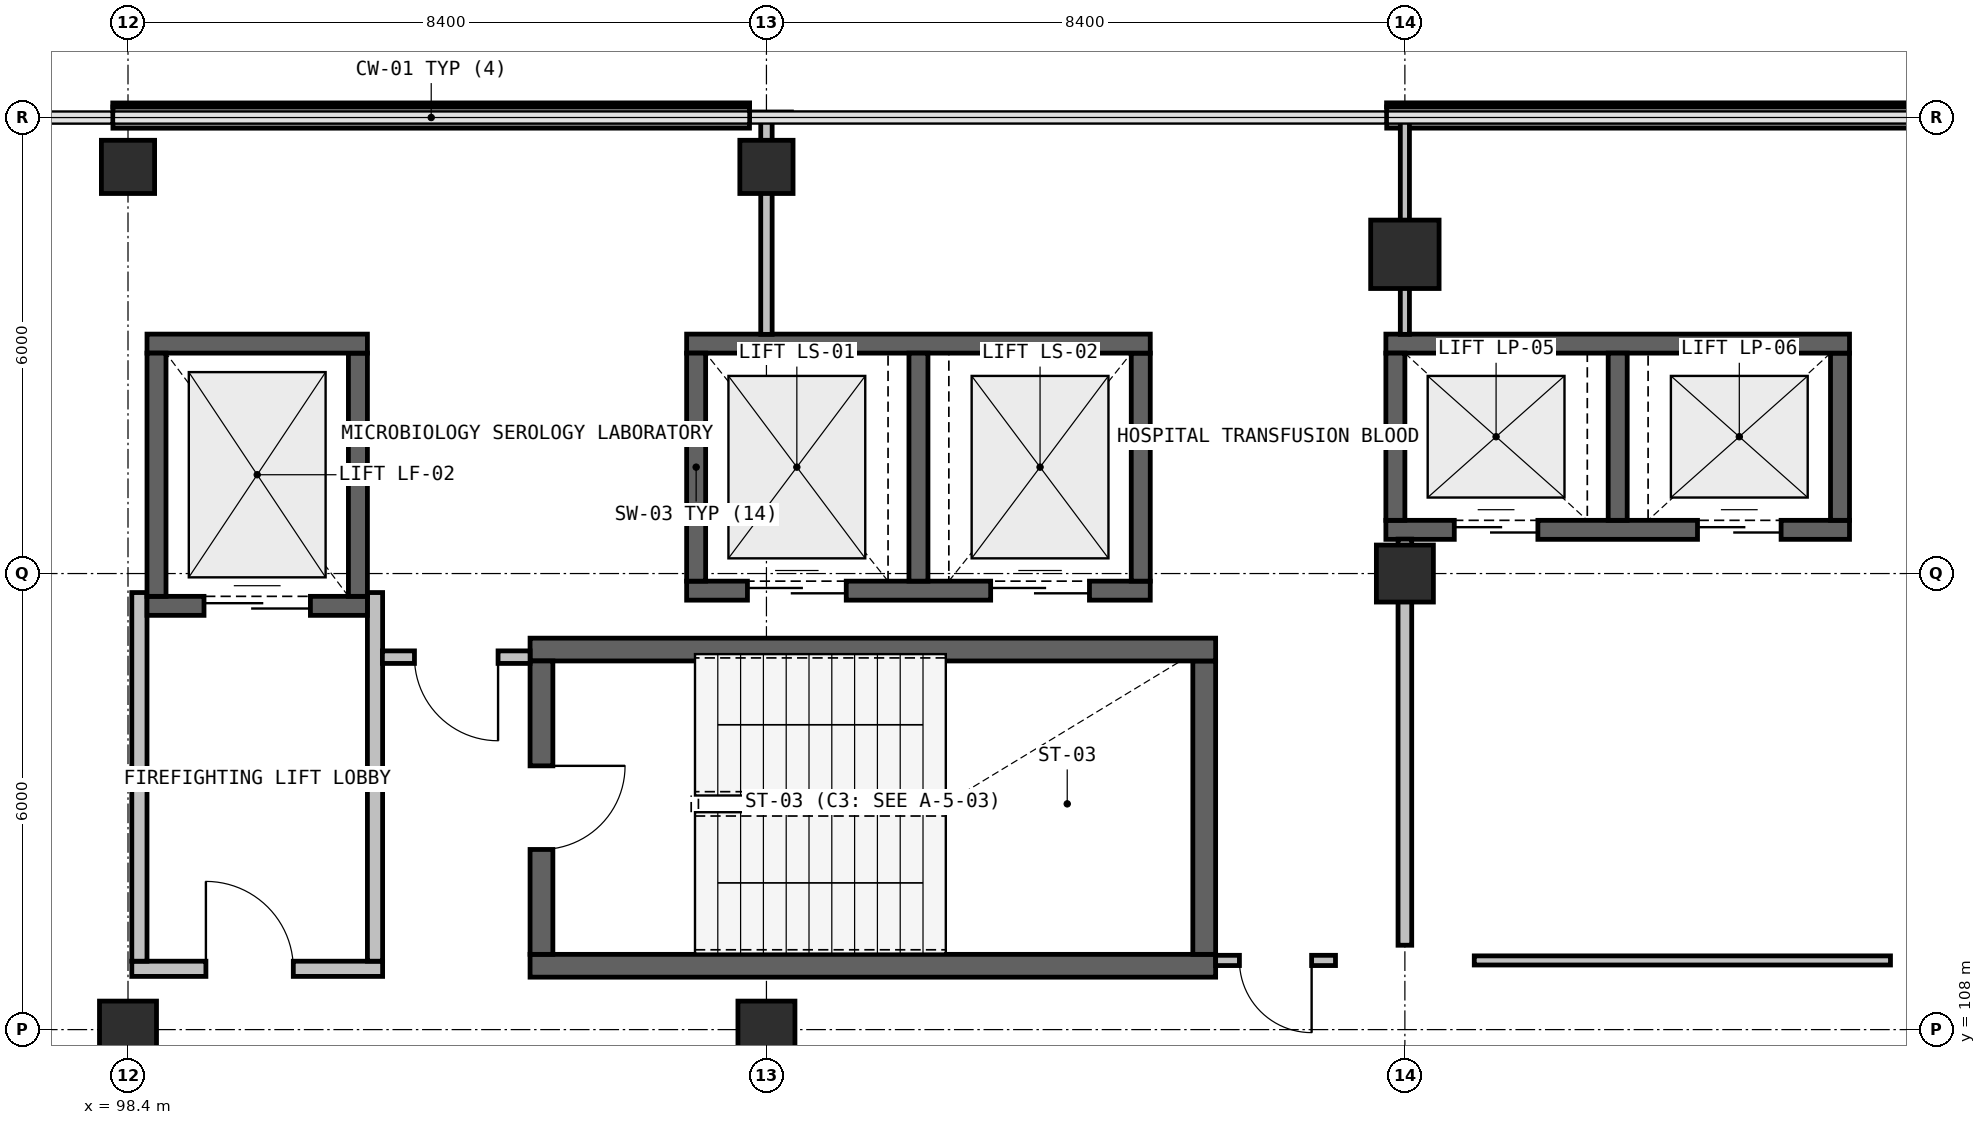
"""IFC4 building model, lengths in metres.
Left out: names, types, materials, properties, quantities, classifications, styles, units other than length and angle.
Written with IfcOpenShell. Run it as: python <this file> out.ifc"""

import sys

from ifc_helpers import new_model, si_unit, direction, frame, frame_2d, origin, origin_2d, place, context, subcontext, project, spatial, rectangle, extrude, element, fill, save


model = new_model("IFC4")
c1 = context("Model", 3, precision=1e-05, world=origin(), true_north=direction((0.0, 1.0)))
c2 = subcontext(c1, "Body", "Model", "MODEL_VIEW")
j1 = project(units=[si_unit("LENGTHUNIT", "METRE"), si_unit("PLANEANGLEUNIT", "RADIAN")], contexts=[c1])
p1 = place(None, origin())
s1 = spatial("IfcSite", under=j1, at=p1, CompositionType="ELEMENT")
p2 = place(p1, origin())
s2 = spatial("IfcBuilding", under=s1, at=p2, CompositionType="ELEMENT")
p3 = place(p2, frame((0.0, 0.0, 15.0)))
s3 = spatial("IfcBuildingStorey", under=s2, at=p3, CompositionType="ELEMENT", Elevation=15.0)
p4 = place(p3, frame((115.2, 118.2, 0.0), z_axis=(0.0, 0.0, 1.0), x_axis=(1.0, 0.0, 0.0)))
e1 = element("IfcColumn", 1, at=p4, inside=s3, PredefinedType="COLUMN", context=c2, shape_type="SweptSolid", body=[
    extrude(rectangle(XDim=0.9, YDim=0.9, at=origin_2d()), origin(), (0.0, 0.0, 1.0), 4.2),
])
p5 = place(p3, frame((98.4, 108.0, 0.0), z_axis=(0.0, 0.0, 1.0), x_axis=(1.0, 0.0, 0.0)))
e2 = element("IfcColumn", 2, at=p5, inside=s3, PredefinedType="COLUMN", context=c2, shape_type="SweptSolid", body=[
    extrude(rectangle(XDim=0.75, YDim=0.75, at=origin_2d()), origin(), (0.0, 0.0, 1.0), 4.2),
])
p6 = place(p3, frame((98.4, 119.35, 0.0), z_axis=(0.0, 0.0, 1.0), x_axis=(1.0, 0.0, 0.0)))
e3 = element("IfcColumn", 3, at=p6, inside=s3, PredefinedType="COLUMN", context=c2, shape_type="SweptSolid", body=[
    extrude(rectangle(XDim=0.7, YDim=0.7, at=origin_2d()), origin(), (0.0, 0.0, 1.0), 4.2),
])
p7 = place(p3, frame((106.8, 108.0, 0.0), z_axis=(0.0, 0.0, 1.0), x_axis=(1.0, 0.0, 0.0)))
e4 = element("IfcColumn", 4, at=p7, inside=s3, PredefinedType="COLUMN", context=c2, shape_type="SweptSolid", body=[
    extrude(rectangle(XDim=0.75, YDim=0.75, at=origin_2d()), origin(), (0.0, 0.0, 1.0), 4.2),
])
p8 = place(p3, frame((106.8, 119.35, 0.0), z_axis=(0.0, 0.0, 1.0), x_axis=(1.0, 0.0, 0.0)))
e5 = element("IfcColumn", 5, at=p8, inside=s3, PredefinedType="COLUMN", context=c2, shape_type="SweptSolid", body=[
    extrude(rectangle(XDim=0.7, YDim=0.7, at=origin_2d()), origin(), (0.0, 0.0, 1.0), 4.2),
])
p9 = place(p3, frame((115.2, 114.0, 0.0), z_axis=(0.0, 0.0, 1.0), x_axis=(1.0, 0.0, 0.0)))
e6 = element("IfcColumn", 6, at=p9, inside=s3, PredefinedType="COLUMN", context=c2, shape_type="SweptSolid", body=[
    extrude(rectangle(XDim=0.75, YDim=0.75, at=origin_2d()), origin(), (0.0, 0.0, 1.0), 4.2),
])
p10 = place(p3, frame((98.202, 119.999, 0.0), z_axis=(0.0, 0.0, 1.0), x_axis=(0.999999993202, 0.000116604477, 0.0)))
e7 = element("IfcWall", 7, at=p10, inside=s3, PredefinedType="SOLIDWALL", context=c2, shape_type="SweptSolid", body=[
    extrude(rectangle(XDim=8.375, YDim=0.28, at=frame_2d((4.188, 0.0))), origin(), (0.0, 0.0, 1.0), 0.94),
])
p11 = place(p3, frame((114.961, 120.0, 0.0), z_axis=(0.0, 0.0, 1.0), x_axis=(1.0, 0.0, 0.0)))
e8 = element("IfcWall", 8, at=p11, inside=s3, PredefinedType="SOLIDWALL", context=c2, shape_type="SweptSolid", body=[
    extrude(rectangle(XDim=8.376, YDim=0.28, at=frame_2d((4.188, 0.0))), origin(), (0.0, 0.0, 1.0), 0.94),
])
p12 = place(p3, frame((98.45, 108.8, 0.0), z_axis=(0.0, 0.0, 1.0), x_axis=(1.0, 0.0, 0.0)))
e9 = element("IfcWall", 9, at=p12, inside=s3, PredefinedType="SOLIDWALL", context=c2, shape_type="SweptSolid", body=[
    extrude(rectangle(XDim=3.3, YDim=0.2, at=frame_2d((1.65, 0.0))), origin(), (0.0, 0.0, 1.0), 3.895),
])
p13 = place(p12, frame((0.975, 0.0, 0.0)))
e10 = element("IfcOpeningElement", 10, at=p13, cuts=e9, PredefinedType="OPENING", context=c2, shape_type="SweptSolid", body=[
    extrude(rectangle(XDim=1.15, YDim=2.15, at=frame_2d((0.575, 1.075))), frame((0.0, 0.11, 0.0), z_axis=(0.0, -1.0, 0.0), x_axis=(1.0, 0.0, 0.0)), (0.0, 0.0, 1.0), 0.22),
])
p14 = place(p3, frame((101.65, 108.9, 0.0), z_axis=(0.0, 0.0, 1.0), x_axis=(0.0, 1.0, 0.0)))
e11 = element("IfcWall", 11, at=p14, inside=s3, PredefinedType="SOLIDWALL", context=c2, shape_type="SweptSolid", body=[
    extrude(rectangle(XDim=4.85, YDim=0.2, at=frame_2d((2.425, 0.0))), origin(), (0.0, 0.0, 1.0), 3.895),
])
p15 = place(p3, frame((98.55, 113.75, 0.0), z_axis=(0.0, 0.0, 1.0), x_axis=(0.0, -1.0, 0.0)))
e12 = element("IfcWall", 12, at=p15, inside=s3, PredefinedType="SOLIDWALL", context=c2, shape_type="SweptSolid", body=[
    extrude(rectangle(XDim=4.85, YDim=0.2, at=frame_2d((2.425, 0.0))), origin(), (0.0, 0.0, 1.0), 3.245),
])
p16 = place(p3, frame((103.69, 108.84, 0.0), z_axis=(0.0, 0.0, 1.0), x_axis=(1.0, 0.0, 0.0)))
e13 = element("IfcWall", 13, at=p16, inside=s3, PredefinedType="SHEAR", context=c2, shape_type="SweptSolid", body=[
    extrude(rectangle(XDim=9.02, YDim=0.3, at=frame_2d((4.51, 0.0))), origin(), (0.0, 0.0, 1.0), 3.895),
])
p17 = place(p3, frame((112.56, 108.99, 0.0), z_axis=(0.0, 0.0, 1.0), x_axis=(0.0, 1.0, 0.0)))
e14 = element("IfcWall", 14, at=p17, inside=s3, PredefinedType="SHEAR", context=c2, shape_type="SweptSolid", body=[
    extrude(rectangle(XDim=3.86, YDim=0.3, at=frame_2d((1.93, 0.0))), origin(), (0.0, 0.0, 1.0), 3.895),
])
p18 = place(p3, frame((112.71, 113.0, 0.0), z_axis=(0.0, 0.0, 1.0), x_axis=(-1.0, 0.0, 0.0)))
e15 = element("IfcWall", 15, at=p18, inside=s3, PredefinedType="SHEAR", context=c2, shape_type="SweptSolid", body=[
    extrude(rectangle(XDim=9.02, YDim=0.3, at=frame_2d((4.51, 0.0))), origin(), (0.0, 0.0, 1.0), 3.895),
])
p19 = place(p3, frame((103.84, 112.85, 0.0), z_axis=(0.0, 0.0, 1.0), x_axis=(0.0, -1.0, 0.0)))
e16 = element("IfcWall", 16, at=p19, inside=s3, PredefinedType="SHEAR", context=c2, shape_type="SweptSolid", body=[
    extrude(rectangle(XDim=3.86, YDim=0.3, at=frame_2d((1.93, 0.0))), origin(), (0.0, 0.0, 1.0), 3.895),
])
p20 = place(p19, frame((1.38, 0.0, 0.0)))
e17 = element("IfcOpeningElement", 17, at=p20, cuts=e16, PredefinedType="OPENING", context=c2, shape_type="SweptSolid", body=[
    extrude(rectangle(XDim=1.1, YDim=2.15, at=frame_2d((0.55, 1.075))), frame((0.0, 0.16, 0.0), z_axis=(0.0, -1.0, 0.0), x_axis=(1.0, 0.0, 0.0)), (0.0, 0.0, 1.0), 0.32),
])
p21 = place(p3, frame((98.65, 113.575, 0.0), z_axis=(0.0, 0.0, 1.0), x_axis=(1.0, 0.0, 0.0)))
e18 = element("IfcWall", 18, at=p21, inside=s3, PredefinedType="SHEAR", context=c2, shape_type="SweptSolid", body=[
    extrude(rectangle(XDim=2.9, YDim=0.25, at=frame_2d((1.45, 0.0))), origin(), (0.0, 0.0, 1.0), 3.895),
])
p22 = place(p21, frame((0.75, 0.0, 0.0)))
e19 = element("IfcOpeningElement", 19, at=p22, cuts=e18, PredefinedType="OPENING", context=c2, shape_type="SweptSolid", body=[
    extrude(rectangle(XDim=1.4, YDim=2.15, at=frame_2d((0.7, 1.075))), frame((0.0, 0.135, 0.0), z_axis=(0.0, -1.0, 0.0), x_axis=(1.0, 0.0, 0.0)), (0.0, 0.0, 1.0), 0.27),
])
p23 = place(p3, frame((101.425, 113.7, 0.0), z_axis=(0.0, 0.0, 1.0), x_axis=(0.0, 1.0, 0.0)))
e20 = element("IfcWall", 20, at=p23, inside=s3, PredefinedType="SHEAR", context=c2, shape_type="SweptSolid", body=[
    extrude(rectangle(XDim=3.2, YDim=0.25, at=frame_2d((1.6, 0.0))), origin(), (0.0, 0.0, 1.0), 3.895),
])
p24 = place(p3, frame((101.55, 117.025, 0.0), z_axis=(0.0, 0.0, 1.0), x_axis=(-1.0, 0.0, 0.0)))
e21 = element("IfcWall", 21, at=p24, inside=s3, PredefinedType="SHEAR", context=c2, shape_type="SweptSolid", body=[
    extrude(rectangle(XDim=2.9, YDim=0.25, at=frame_2d((1.45, 0.0))), origin(), (0.0, 0.0, 1.0), 3.895),
])
p25 = place(p3, frame((98.775, 116.9, 0.0), z_axis=(0.0, 0.0, 1.0), x_axis=(0.0, -1.0, 0.0)))
e22 = element("IfcWall", 22, at=p25, inside=s3, PredefinedType="SHEAR", context=c2, shape_type="SweptSolid", body=[
    extrude(rectangle(XDim=3.2, YDim=0.25, at=frame_2d((1.6, 0.0))), origin(), (0.0, 0.0, 1.0), 3.895),
])
p26 = place(p3, frame((105.75, 113.775, 0.0), z_axis=(0.0, 0.0, 1.0), x_axis=(1.0, 0.0, 0.0)))
e23 = element("IfcWall", 23, at=p26, inside=s3, PredefinedType="SHEAR", context=c2, shape_type="SweptSolid", body=[
    extrude(rectangle(XDim=6.1, YDim=0.25, at=frame_2d((3.05, 0.0))), origin(), (0.0, 0.0, 1.0), 3.895),
])
p27 = place(p26, frame((0.8, 0.0, 0.0)))
e24 = element("IfcOpeningElement", 24, at=p27, cuts=e23, PredefinedType="OPENING", context=c2, shape_type="SweptSolid", body=[
    extrude(rectangle(XDim=1.3, YDim=2.15, at=frame_2d((0.65, 1.075))), frame((0.0, 0.135, 0.0), z_axis=(0.0, -1.0, 0.0), x_axis=(1.0, 0.0, 0.0)), (0.0, 0.0, 1.0), 0.27),
])
p28 = place(p26, frame((4.0, 0.0, 0.0)))
e25 = element("IfcOpeningElement", 25, at=p28, cuts=e23, PredefinedType="OPENING", context=c2, shape_type="SweptSolid", body=[
    extrude(rectangle(XDim=1.3, YDim=2.15, at=frame_2d((0.65, 1.075))), frame((0.0, 0.135, 0.0), z_axis=(0.0, -1.0, 0.0), x_axis=(1.0, 0.0, 0.0)), (0.0, 0.0, 1.0), 0.27),
])
p29 = place(p3, frame((111.725, 113.9, 0.0), z_axis=(0.0, 0.0, 1.0), x_axis=(0.0, 1.0, 0.0)))
e26 = element("IfcWall", 26, at=p29, inside=s3, PredefinedType="SHEAR", context=c2, shape_type="SweptSolid", body=[
    extrude(rectangle(XDim=3.0, YDim=0.25, at=frame_2d((1.5, 0.0))), origin(), (0.0, 0.0, 1.0), 3.895),
])
p30 = place(p3, frame((111.85, 117.025, 0.0), z_axis=(0.0, 0.0, 1.0), x_axis=(-1.0, 0.0, 0.0)))
e27 = element("IfcWall", 27, at=p30, inside=s3, PredefinedType="SHEAR", context=c2, shape_type="SweptSolid", body=[
    extrude(rectangle(XDim=6.1, YDim=0.25, at=frame_2d((3.05, 0.0))), origin(), (0.0, 0.0, 1.0), 3.895),
])
for number, where, z_axis, x_axis in (
    (28, (105.875, 116.9, 0.0), (0.0, 0.0, 1.0), (0.0, -1.0, 0.0)),
    (29, (108.8, 113.9, 0.0), (0.0, 0.0, 1.0), (0.0, 1.0, 0.0)),
):
    element("IfcWall", number, at=place(p3, frame(where, z_axis=z_axis, x_axis=x_axis)), inside=s3, PredefinedType="SHEAR", context=c2, shape_type="SweptSolid", body=[
        extrude(rectangle(XDim=3.0, YDim=0.25, at=frame_2d((1.5, 0.0))), origin(), (0.0, 0.0, 1.0), 3.895),
    ])
p31 = place(p3, frame((114.95, 114.575, 0.0), z_axis=(0.0, 0.0, 1.0), x_axis=(1.0, 0.0, 0.0)))
e30 = element("IfcWall", 30, at=p31, inside=s3, PredefinedType="SHEAR", context=c2, shape_type="SweptSolid", body=[
    extrude(rectangle(XDim=6.1, YDim=0.25, at=frame_2d((3.05, 0.0))), origin(), (0.0, 0.0, 1.0), 3.895),
])
p32 = place(p31, frame((0.9, 0.0, 0.0)))
e31 = element("IfcOpeningElement", 31, at=p32, cuts=e30, PredefinedType="OPENING", context=c2, shape_type="SweptSolid", body=[
    extrude(rectangle(XDim=1.1, YDim=2.15, at=frame_2d((0.55, 1.075))), frame((0.0, 0.135, 0.0), z_axis=(0.0, -1.0, 0.0), x_axis=(1.0, 0.0, 0.0)), (0.0, 0.0, 1.0), 0.27),
])
p33 = place(p31, frame((4.1, 0.0, 0.0)))
e32 = element("IfcOpeningElement", 32, at=p33, cuts=e30, PredefinedType="OPENING", context=c2, shape_type="SweptSolid", body=[
    extrude(rectangle(XDim=1.1, YDim=2.15, at=frame_2d((0.55, 1.075))), frame((0.0, 0.135, 0.0), z_axis=(0.0, -1.0, 0.0), x_axis=(1.0, 0.0, 0.0)), (0.0, 0.0, 1.0), 0.27),
])
p34 = place(p3, frame((120.925, 114.7, 0.0), z_axis=(0.0, 0.0, 1.0), x_axis=(0.0, 1.0, 0.0)))
e33 = element("IfcWall", 33, at=p34, inside=s3, PredefinedType="SHEAR", context=c2, shape_type="SweptSolid", body=[
    extrude(rectangle(XDim=2.2, YDim=0.25, at=frame_2d((1.1, 0.0))), origin(), (0.0, 0.0, 1.0), 3.895),
])
p35 = place(p3, frame((121.05, 117.025, 0.0), z_axis=(0.0, 0.0, 1.0), x_axis=(-1.0, 0.0, 0.0)))
e34 = element("IfcWall", 34, at=p35, inside=s3, PredefinedType="SHEAR", context=c2, shape_type="SweptSolid", body=[
    extrude(rectangle(XDim=6.1, YDim=0.25, at=frame_2d((3.05, 0.0))), origin(), (0.0, 0.0, 1.0), 3.895),
])
for number, where, z_axis, x_axis in (
    (35, (115.075, 116.9, 0.0), (0.0, 0.0, 1.0), (0.0, -1.0, 0.0)),
    (36, (118.0, 114.7, 0.0), (0.0, 0.0, 1.0), (0.0, 1.0, 0.0)),
):
    element("IfcWall", number, at=place(p3, frame(where, z_axis=z_axis, x_axis=x_axis)), inside=s3, PredefinedType="SHEAR", context=c2, shape_type="SweptSolid", body=[
        extrude(rectangle(XDim=2.2, YDim=0.25, at=frame_2d((1.1, 0.0))), origin(), (0.0, 0.0, 1.0), 3.895),
    ])
p36 = place(p3, frame((103.69, 112.9, 0.0), z_axis=(0.0, 0.0, 1.0), x_axis=(-1.0, 0.0, 0.0)))
e37 = element("IfcWall", 37, at=p36, inside=s3, PredefinedType="PARTITIONING", context=c2, shape_type="SweptSolid", body=[
    extrude(rectangle(XDim=1.943, YDim=0.165, at=frame_2d((0.971, 0.0))), origin(), (0.0, 0.0, 1.0), 3.895),
])
p37 = place(p36, frame((0.421, 0.0, 0.0)))
e38 = element("IfcOpeningElement", 38, at=p37, cuts=e37, PredefinedType="OPENING", context=c2, shape_type="SweptSolid", body=[
    extrude(rectangle(XDim=1.1, YDim=2.15, at=frame_2d((0.55, 1.075))), frame((0.0, 0.093, 0.0), z_axis=(0.0, -1.0, 0.0), x_axis=(1.0, 0.0, 0.0)), (0.0, 0.0, 1.0), 0.185),
])
p38 = place(p3, frame((106.8, 119.989, 0.0), z_axis=(0.0, 0.0, 1.0), x_axis=(0.0, -1.0, 0.0)))
e39 = element("IfcWall", 39, at=p38, inside=s3, PredefinedType="PARTITIONING", context=c2, shape_type="SweptSolid", body=[
    extrude(rectangle(XDim=2.842, YDim=0.15, at=frame_2d((1.421, 0.0))), origin(), (0.0, 0.0, 1.0), 3.895),
])
p39 = place(p3, frame((114.287, 108.91, 0.0), z_axis=(0.0, 0.0, 1.0), x_axis=(-1.0, 0.0, 0.0)))
e40 = element("IfcWall", 40, at=p39, inside=s3, PredefinedType="PARTITIONING", context=c2, shape_type="SweptSolid", body=[
    extrude(rectangle(XDim=1.577, YDim=0.135, at=frame_2d((0.789, 0.0))), origin(), (0.0, 0.0, 1.0), 3.895),
])
p40 = place(p39, frame((0.314, 0.0, 0.0)))
e41 = element("IfcOpeningElement", 41, at=p40, cuts=e40, PredefinedType="OPENING", context=c2, shape_type="SweptSolid", body=[
    extrude(rectangle(XDim=0.95, YDim=2.1, at=frame_2d((0.475, 1.05))), frame((0.0, 0.077, 0.0), z_axis=(0.0, -1.0, 0.0), x_axis=(1.0, 0.0, 0.0)), (0.0, 0.0, 1.0), 0.155),
])
p41 = place(p3, frame((115.2, 119.958, 0.0), z_axis=(0.0, 0.0, 1.0), x_axis=(0.0, -1.0, 0.0)))
e42 = element("IfcWall", 42, at=p41, inside=s3, PredefinedType="PARTITIONING", context=c2, shape_type="SweptSolid", body=[
    extrude(rectangle(XDim=2.811, YDim=0.12, at=frame_2d((1.406, 0.0))), origin(), (0.0, 0.0, 1.0), 3.895),
])
p42 = place(p3, frame((115.2, 114.453, 0.0), z_axis=(0.0, 0.0, 1.0), x_axis=(0.0, -1.0, 0.0)))
e43 = element("IfcWall", 43, at=p42, inside=s3, PredefinedType="PARTITIONING", context=c2, shape_type="SweptSolid", body=[
    extrude(rectangle(XDim=5.343, YDim=0.18, at=frame_2d((2.671, 0.0))), origin(), (0.0, 0.0, 1.0), 3.245),
])
p43 = place(p3, frame((121.589, 108.91, 0.0), z_axis=(0.0, 0.0, 1.0), x_axis=(-1.0, 0.0, 0.0)))
e44 = element("IfcWall", 44, at=p43, inside=s3, PredefinedType="PARTITIONING", context=c2, shape_type="SweptSolid", body=[
    extrude(rectangle(XDim=5.476, YDim=0.12, at=frame_2d((2.738, 0.0))), origin(), (0.0, 0.0, 1.0), 3.895),
])
p44 = place(p13, origin())
e45 = element("IfcDoor", 45, at=p44, inside=s3, OperationType="SINGLE_SWING_LEFT", PredefinedType="DOOR", context=c2, shape_type="SweptSolid", body=[
    extrude(rectangle(XDim=1.15, YDim=2.15, at=frame_2d((0.575, 1.075))), frame((0.0, 0.025, 0.0), z_axis=(0.0, -1.0, 0.0), x_axis=(1.0, 0.0, 0.0)), (0.0, 0.0, 1.0), 0.05),
])
fill(e10, e45)
p45 = place(p20, origin())
e46 = element("IfcDoor", 46, at=p45, inside=s3, OperationType="SINGLE_SWING_LEFT", PredefinedType="DOOR", context=c2, shape_type="SweptSolid", body=[
    extrude(rectangle(XDim=1.1, YDim=2.15, at=frame_2d((0.55, 1.075))), frame((0.0, 0.025, 0.0), z_axis=(0.0, -1.0, 0.0), x_axis=(1.0, 0.0, 0.0)), (0.0, 0.0, 1.0), 0.05),
])
fill(e17, e46)
p46 = place(p22, origin())
e47 = element("IfcDoor", 47, at=p46, inside=s3, OperationType="DOUBLE_DOOR_SLIDING", PredefinedType="DOOR", context=c2, shape_type="SweptSolid", body=[
    extrude(rectangle(XDim=1.4, YDim=2.15, at=frame_2d((0.7, 1.075))), frame((0.0, 0.025, 0.0), z_axis=(0.0, -1.0, 0.0), x_axis=(1.0, 0.0, 0.0)), (0.0, 0.0, 1.0), 0.05),
])
fill(e19, e47)
p47 = place(p27, origin())
e48 = element("IfcDoor", 48, at=p47, inside=s3, OperationType="DOUBLE_DOOR_SLIDING", PredefinedType="DOOR", context=c2, shape_type="SweptSolid", body=[
    extrude(rectangle(XDim=1.3, YDim=2.15, at=frame_2d((0.65, 1.075))), frame((0.0, 0.025, 0.0), z_axis=(0.0, -1.0, 0.0), x_axis=(1.0, 0.0, 0.0)), (0.0, 0.0, 1.0), 0.05),
])
fill(e24, e48)
p48 = place(p28, origin())
e49 = element("IfcDoor", 49, at=p48, inside=s3, OperationType="DOUBLE_DOOR_SLIDING", PredefinedType="DOOR", context=c2, shape_type="SweptSolid", body=[
    extrude(rectangle(XDim=1.3, YDim=2.15, at=frame_2d((0.65, 1.075))), frame((0.0, 0.025, 0.0), z_axis=(0.0, -1.0, 0.0), x_axis=(1.0, 0.0, 0.0)), (0.0, 0.0, 1.0), 0.05),
])
fill(e25, e49)
p49 = place(p32, origin())
e50 = element("IfcDoor", 50, at=p49, inside=s3, OperationType="DOUBLE_DOOR_SLIDING", PredefinedType="DOOR", context=c2, shape_type="SweptSolid", body=[
    extrude(rectangle(XDim=1.1, YDim=2.15, at=frame_2d((0.55, 1.075))), frame((0.0, 0.025, 0.0), z_axis=(0.0, -1.0, 0.0), x_axis=(1.0, 0.0, 0.0)), (0.0, 0.0, 1.0), 0.05),
])
fill(e31, e50)
p50 = place(p33, origin())
e51 = element("IfcDoor", 51, at=p50, inside=s3, OperationType="DOUBLE_DOOR_SLIDING", PredefinedType="DOOR", context=c2, shape_type="SweptSolid", body=[
    extrude(rectangle(XDim=1.1, YDim=2.15, at=frame_2d((0.55, 1.075))), frame((0.0, 0.025, 0.0), z_axis=(0.0, -1.0, 0.0), x_axis=(1.0, 0.0, 0.0)), (0.0, 0.0, 1.0), 0.05),
])
fill(e32, e51)
p51 = place(p37, origin())
e52 = element("IfcDoor", 52, at=p51, inside=s3, OperationType="SINGLE_SWING_LEFT", PredefinedType="DOOR", context=c2, shape_type="SweptSolid", body=[
    extrude(rectangle(XDim=1.1, YDim=2.15, at=frame_2d((0.55, 1.075))), frame((0.0, 0.025, 0.0), z_axis=(0.0, -1.0, 0.0), x_axis=(1.0, 0.0, 0.0)), (0.0, 0.0, 1.0), 0.05),
])
fill(e38, e52)
p52 = place(p40, origin())
e53 = element("IfcDoor", 53, at=p52, inside=s3, OperationType="SINGLE_SWING_RIGHT", PredefinedType="DOOR", context=c2, shape_type="SweptSolid", body=[
    extrude(rectangle(XDim=0.95, YDim=2.1, at=frame_2d((0.475, 1.05))), frame((0.0, 0.025, 0.0), z_axis=(0.0, -1.0, 0.0), x_axis=(1.0, 0.0, 0.0)), (0.0, 0.0, 1.0), 0.05),
])
fill(e41, e53)
save(model, sys.argv[1])
